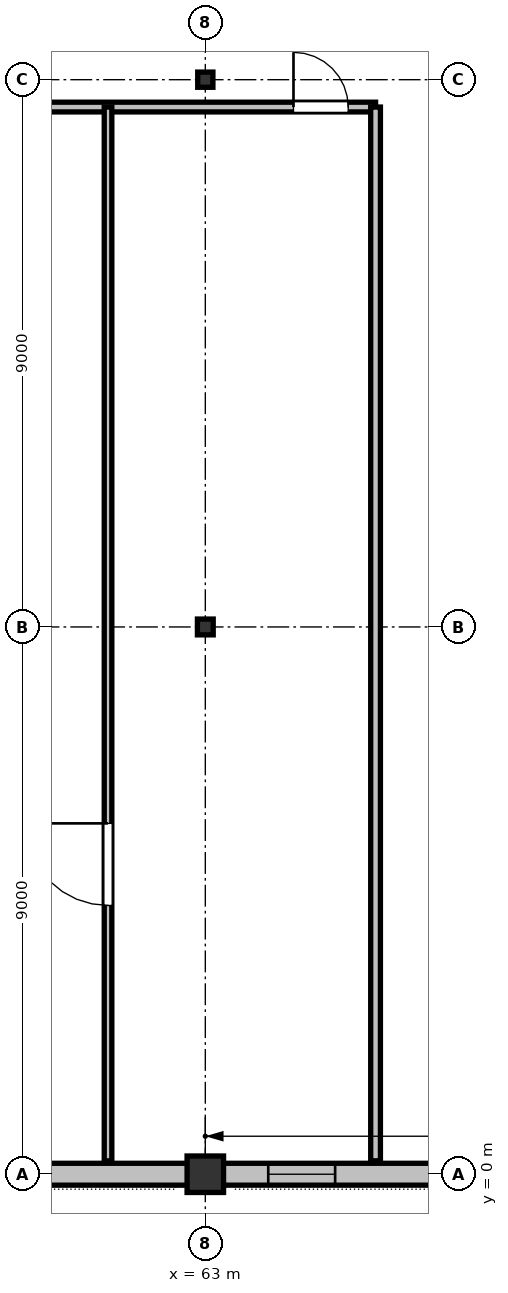
"""IFC4 building model, lengths in metres.
Left out: names, types, materials, properties, quantities, classifications, styles, units other than length and angle.
Written with IfcOpenShell. Run it as: python <this file> out.ifc"""

import sys

from ifc_helpers import new_model, si_unit, direction, frame, frame_2d, origin, origin_2d, place, context, subcontext, project, spatial, rectangle, hollow_rectangle, i_section, extrude, element, fill, save


model = new_model("IFC4")
c1 = context("Model", 3, precision=1e-05, world=origin(), true_north=direction((0.0, 1.0)))
c2 = subcontext(c1, "Body", "Model", "MODEL_VIEW")
j1 = project(units=[si_unit("LENGTHUNIT", "METRE"), si_unit("PLANEANGLEUNIT", "RADIAN")], contexts=[c1])
p1 = place(None, origin())
s1 = spatial("IfcSite", under=j1, at=p1, CompositionType="ELEMENT")
p2 = place(p1, origin())
s2 = spatial("IfcBuilding", under=s1, at=p2, CompositionType="ELEMENT")
p3 = place(p2, frame((0.0, 0.0, 31.8)))
s3 = spatial("IfcBuildingStorey", under=s2, at=p3, CompositionType="ELEMENT", Elevation=31.8)
p4 = place(p3, frame((63.0, 0.0, 0.0), z_axis=(0.0, 0.0, 1.0), x_axis=(1.0, 0.0, 0.0)))
e1 = element("IfcColumn", 1, at=p4, inside=s3, PredefinedType="COLUMN", context=c2, shape_type="SweptSolid", body=[
    extrude(rectangle(XDim=0.6, YDim=0.6, at=origin_2d()), origin(), (0.0, 0.0, 1.0), 4.2),
])
p5 = place(p3, frame((63.0, 9.0, 0.0), z_axis=(0.0, 0.0, 1.0), x_axis=(1.0, 0.0, 0.0)))
e2 = element("IfcColumn", 2, at=p5, inside=s3, PredefinedType="COLUMN", context=c2, shape_type="SweptSolid", body=[
    extrude(i_section(OverallWidth=0.26, OverallDepth=0.26, WebThickness=0.01, FlangeThickness=0.018, at=origin_2d()), origin(), (0.0, 0.0, 1.0), 4.2),
])
p6 = place(p3, frame((63.0, 18.0, 0.0), z_axis=(0.0, 0.0, 1.0), x_axis=(1.0, 0.0, 0.0)))
e3 = element("IfcColumn", 3, at=p6, inside=s3, PredefinedType="COLUMN", context=c2, shape_type="SweptSolid", body=[
    extrude(hollow_rectangle(XDim=0.25, YDim=0.25, WallThickness=0.012, at=origin_2d()), origin(), (0.0, 0.0, 1.0), 4.2),
])
p7 = place(p3, frame((54.285, 0.0, 0.0), z_axis=(0.0, 0.0, 1.0), x_axis=(1.0, 0.0, 0.0)))
e4 = element("IfcWall", 4, at=p7, inside=s3, PredefinedType="STANDARD", context=c2, shape_type="SweptSolid", body=[
    extrude(rectangle(XDim=8.43, YDim=0.36, at=frame_2d((4.215, 0.0))), origin(), (0.0, 0.0, 1.0), 3.735),
])
p8 = place(p7, frame((3.615, 0.0, 0.9)))
e5 = element("IfcOpeningElement", 5, at=p8, cuts=e4, PredefinedType="OPENING", context=c2, shape_type="SweptSolid", body=[
    extrude(rectangle(XDim=1.2, YDim=1.8, at=frame_2d((0.6, 0.9))), frame((0.0, 0.19, 0.0), z_axis=(0.0, -1.0, 0.0), x_axis=(1.0, 0.0, 0.0)), (0.0, 0.0, 1.0), 0.38),
])
p9 = place(p3, frame((63.285, 0.0, 0.0), z_axis=(0.0, 0.0, 1.0), x_axis=(1.0, 0.0, 0.0)))
e6 = element("IfcWall", 6, at=p9, inside=s3, PredefinedType="STANDARD", context=c2, shape_type="SweptSolid", body=[
    extrude(rectangle(XDim=8.43, YDim=0.36, at=frame_2d((4.215, 0.0))), origin(), (0.0, 0.0, 1.0), 3.735),
])
p10 = place(p9, frame((0.75, 0.0, 0.9)))
e7 = element("IfcOpeningElement", 7, at=p10, cuts=e6, PredefinedType="OPENING", context=c2, shape_type="SweptSolid", body=[
    extrude(rectangle(XDim=1.1, YDim=1.75, at=frame_2d((0.55, 0.875))), frame((0.0, 0.19, 0.0), z_axis=(0.0, -1.0, 0.0), x_axis=(1.0, 0.0, 0.0)), (0.0, 0.0, 1.0), 0.38),
])
p11 = place(p3, frame((42.2, 17.55, 0.0), z_axis=(0.0, 0.0, 1.0), x_axis=(1.0, 0.0, 0.0)))
e8 = element("IfcWall", 8, at=p11, inside=s3, PredefinedType="PARTITIONING", context=c2, shape_type="SweptSolid", body=[
    extrude(rectangle(XDim=23.6, YDim=0.16, at=frame_2d((11.8, 0.0))), origin(), (0.0, 0.0, 1.0), 3.96),
])
p12 = place(p11, frame((0.45, 0.0, 0.0)))
e9 = element("IfcOpeningElement", 9, at=p12, cuts=e8, PredefinedType="OPENING", context=c2, shape_type="SweptSolid", body=[
    extrude(rectangle(XDim=1.05, YDim=2.15, at=frame_2d((0.525, 1.075))), frame((0.0, 0.09, 0.0), z_axis=(0.0, -1.0, 0.0), x_axis=(1.0, 0.0, 0.0)), (0.0, 0.0, 1.0), 0.18),
])
p13 = place(p11, frame((6.733, 0.0, 0.0)))
e10 = element("IfcOpeningElement", 10, at=p13, cuts=e8, PredefinedType="OPENING", context=c2, shape_type="SweptSolid", body=[
    extrude(rectangle(XDim=1.0, YDim=2.14, at=frame_2d((0.5, 1.07))), frame((0.0, 0.09, 0.0), z_axis=(0.0, -1.0, 0.0), x_axis=(1.0, 0.0, 0.0)), (0.0, 0.0, 1.0), 0.18),
])
p14 = place(p11, frame((15.769, 0.0, 0.0)))
e11 = element("IfcOpeningElement", 11, at=p14, cuts=e8, PredefinedType="OPENING", context=c2, shape_type="SweptSolid", body=[
    extrude(rectangle(XDim=0.95, YDim=2.12, at=frame_2d((0.475, 1.06))), frame((0.0, 0.09, 0.0), z_axis=(0.0, -1.0, 0.0), x_axis=(1.0, 0.0, 0.0)), (0.0, 0.0, 1.0), 0.18),
])
p15 = place(p11, frame((22.25, 0.0, 0.0)))
e12 = element("IfcOpeningElement", 12, at=p15, cuts=e8, PredefinedType="OPENING", context=c2, shape_type="SweptSolid", body=[
    extrude(rectangle(XDim=0.9, YDim=2.1, at=frame_2d((0.45, 1.05))), frame((0.0, 0.09, 0.0), z_axis=(0.0, -1.0, 0.0), x_axis=(1.0, 0.0, 0.0)), (0.0, 0.0, 1.0), 0.18),
])
p16 = place(p3, frame((65.8, 0.22, 0.0), z_axis=(0.0, 0.0, 1.0), x_axis=(0.0, 1.0, 0.0)))
e13 = element("IfcWall", 13, at=p16, inside=s3, PredefinedType="PARTITIONING", context=c2, shape_type="SweptSolid", body=[
    extrude(rectangle(XDim=17.33, YDim=0.16, at=frame_2d((8.665, 0.0))), origin(), (0.0, 0.0, 1.0), 3.96),
])
p17 = place(p3, frame((61.4, 0.22, 0.0), z_axis=(0.0, 0.0, 1.0), x_axis=(0.0, 1.0, 0.0)))
e14 = element("IfcWall", 14, at=p17, inside=s3, PredefinedType="PARTITIONING", context=c2, shape_type="SweptSolid", body=[
    extrude(rectangle(XDim=17.33, YDim=0.125, at=frame_2d((8.665, 0.0))), origin(), (0.0, 0.0, 1.0), 3.96),
])
p18 = place(p17, frame((4.2, 0.0, 0.0)))
e15 = element("IfcOpeningElement", 15, at=p18, cuts=e14, PredefinedType="OPENING", context=c2, shape_type="SweptSolid", body=[
    extrude(rectangle(XDim=1.35, YDim=2.18, at=frame_2d((0.675, 1.09))), frame((0.0, 0.073, 0.0), z_axis=(0.0, -1.0, 0.0), x_axis=(1.0, 0.0, 0.0)), (0.0, 0.0, 1.0), 0.145),
])
p19 = place(p10, origin())
e16 = element("IfcWindow", 16, at=p19, inside=s3, PartitioningType="SINGLE_PANEL", PredefinedType="WINDOW", context=c2, shape_type="SweptSolid", body=[
    extrude(rectangle(XDim=1.1, YDim=1.75, at=frame_2d((0.55, 0.875))), frame((0.0, 0.03, 0.0), z_axis=(0.0, -1.0, 0.0), x_axis=(1.0, 0.0, 0.0)), (0.0, 0.0, 1.0), 0.06),
])
fill(e7, e16)
p20 = place(p18, origin())
e17 = element("IfcDoor", 17, at=p20, inside=s3, OperationType="SINGLE_SWING_RIGHT", PredefinedType="DOOR", context=c2, shape_type="SweptSolid", body=[
    extrude(rectangle(XDim=1.35, YDim=2.18, at=frame_2d((0.675, 1.09))), frame((0.0, 0.025, 0.0), z_axis=(0.0, -1.0, 0.0), x_axis=(1.0, 0.0, 0.0)), (0.0, 0.0, 1.0), 0.05),
])
fill(e15, e17)
p21 = place(p15, origin())
e18 = element("IfcDoor", 18, at=p21, inside=s3, OperationType="SINGLE_SWING_LEFT", PredefinedType="DOOR", context=c2, shape_type="SweptSolid", body=[
    extrude(rectangle(XDim=0.9, YDim=2.1, at=frame_2d((0.45, 1.05))), frame((0.0, 0.025, 0.0), z_axis=(0.0, -1.0, 0.0), x_axis=(1.0, 0.0, 0.0)), (0.0, 0.0, 1.0), 0.05),
])
fill(e12, e18)
save(model, sys.argv[1])
